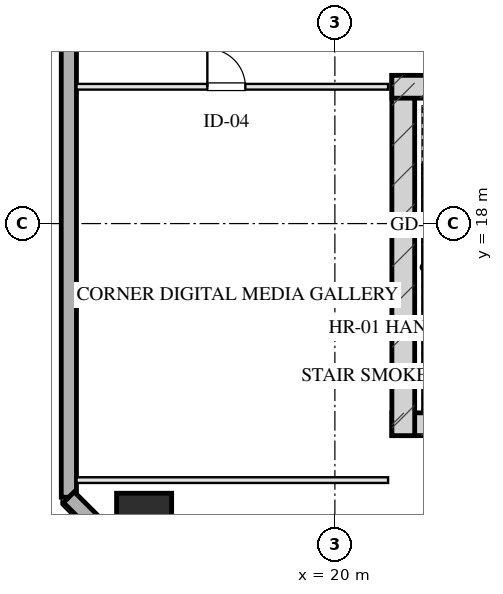
"""IFC4 building model, lengths in metres.
Left out: names, types, materials, properties, quantities, classifications, styles, units other than length and angle.
Written with IfcOpenShell. Run it as: python <this file> out.ifc"""

import sys

from ifc_helpers import new_model, si_unit, direction, frame, frame_2d, origin, origin_2d, place, context, subcontext, project, spatial, rectangle, hollow_rectangle, extrude, element, fill, save


model = new_model("IFC4")
c1 = context("Model", 3, precision=1e-05, world=origin(), true_north=direction((0.0, 1.0)))
c2 = subcontext(c1, "Body", "Model", "MODEL_VIEW")
j1 = project(units=[si_unit("LENGTHUNIT", "METRE"), si_unit("PLANEANGLEUNIT", "RADIAN")], contexts=[c1])
p1 = place(None, origin())
s1 = spatial("IfcSite", under=j1, at=p1, CompositionType="ELEMENT")
p2 = place(p1, origin())
s2 = spatial("IfcBuilding", under=s1, at=p2, CompositionType="ELEMENT")
p3 = place(p2, frame((0.0, 0.0, 173.65)))
s3 = spatial("IfcBuildingStorey", under=s2, at=p3, CompositionType="ELEMENT", Elevation=173.65)
p4 = place(p3, frame((21.5, 12.72, 0.0), z_axis=(0.0, 0.0, 1.0), x_axis=(1.0, 0.0, 0.0)))
e1 = element("IfcWall", 1, at=p4, inside=s3, PredefinedType="SHEAR", context=c2, shape_type="SweptSolid", body=[
    extrude(rectangle(XDim=17.0, YDim=0.6, at=frame_2d((8.5, 0.0))), origin(), (0.0, 0.0, 1.0), 3.45),
])
p5 = place(p3, frame((21.8, 21.9, 0.0), z_axis=(0.0, 0.0, 1.0), x_axis=(0.0, -1.0, 0.0)))
e2 = element("IfcWall", 2, at=p5, inside=s3, PredefinedType="SHEAR", context=c2, shape_type="SweptSolid", body=[
    extrude(rectangle(XDim=9.48, YDim=0.6, at=frame_2d((4.74, 0.0))), origin(), (0.0, 0.0, 1.0), 3.45),
])
p6 = place(p3, frame((21.5, 21.6, 0.0), z_axis=(0.0, 0.0, 1.0), x_axis=(1.0, 0.0, 0.0)))
e3 = element("IfcWall", 3, at=p6, inside=s3, PredefinedType="SHEAR", context=c2, shape_type="SweptSolid", body=[
    extrude(rectangle(XDim=4.22, YDim=0.6, at=frame_2d((2.11, 0.0))), origin(), (0.0, 0.0, 1.0), 3.45),
])
p7 = place(p3, frame((14.98, 10.18, 0.0), z_axis=(0.0, 0.0, 1.0), x_axis=(1.0, 0.0, 0.0)))
e4 = element("IfcColumn", 4, at=p7, inside=s3, PredefinedType="COLUMN", context=c2, shape_type="SweptSolid", body=[
    extrude(hollow_rectangle(XDim=1.45, YDim=1.45, WallThickness=0.05, at=origin_2d()), origin(), (0.0, 0.0, 1.0), 3.451),
])
p8 = place(p3, frame((13.0, 10.8, 0.0), z_axis=(0.0, 0.0, 1.0), x_axis=(0.0, 1.0, 0.0)))
e5 = element("IfcWall", 5, at=p8, inside=s3, PredefinedType="SOLIDWALL", context=c2, shape_type="SweptSolid", body=[
    extrude(rectangle(XDim=46.4, YDim=0.4, at=frame_2d((23.2, 0.0))), origin(), (0.0, 0.0, 1.0), 2.61),
])
p9 = place(p8, frame((16.85, 0.0, 0.0)))
e6 = element("IfcOpeningElement", 6, at=p9, cuts=e5, PredefinedType="OPENING", context=c2, shape_type="SweptSolid", body=[
    extrude(rectangle(XDim=1.1, YDim=2.15, at=frame_2d((0.55, 1.075))), frame((0.0, 0.21, 0.0), z_axis=(0.0, -1.0, 0.0), x_axis=(1.0, 0.0, 0.0)), (0.0, 0.0, 1.0), 0.42),
])
p10 = place(p3, frame((15.6, 8.2, 0.0), z_axis=(0.0, 0.0, 1.0), x_axis=(-0.707106781187, 0.707106781187, 0.0)))
e7 = element("IfcWall", 7, at=p10, inside=s3, PredefinedType="SOLIDWALL", context=c2, shape_type="SweptSolid", body=[
    extrude(rectangle(XDim=3.677, YDim=0.4, at=frame_2d((1.838, 0.0))), origin(), (0.0, 0.0, 1.0), 2.61),
])
p11 = place(p3, frame((13.2, 11.25, 0.0), z_axis=(0.0, 0.0, 1.0), x_axis=(1.0, 0.0, 0.0)))
e8 = element("IfcWall", 8, at=p11, inside=s3, PredefinedType="PARTITIONING", context=c2, shape_type="SweptSolid", body=[
    extrude(rectangle(XDim=8.2, YDim=0.15, at=frame_2d((4.1, 0.0))), origin(), (0.0, 0.0, 1.0), 3.175),
])
p12 = place(p3, frame((13.2, 21.6, 0.0), z_axis=(0.0, 0.0, 1.0), x_axis=(1.0, 0.0, 0.0)))
e9 = element("IfcWall", 9, at=p12, inside=s3, PredefinedType="PARTITIONING", context=c2, shape_type="SweptSolid", body=[
    extrude(rectangle(XDim=8.2, YDim=0.15, at=frame_2d((4.1, 0.0))), origin(), (0.0, 0.0, 1.0), 3.175),
])
p13 = place(p12, frame((3.444, 0.0, 0.0)))
e10 = element("IfcOpeningElement", 10, at=p13, cuts=e9, PredefinedType="OPENING", context=c2, shape_type="SweptSolid", body=[
    extrude(rectangle(XDim=1.0, YDim=2.05, at=frame_2d((0.5, 1.025))), frame((0.0, 0.085, 0.0), z_axis=(0.0, -1.0, 0.0), x_axis=(1.0, 0.0, 0.0)), (0.0, 0.0, 1.0), 0.17),
])
p14 = place(p13, origin())
e11 = element("IfcDoor", 11, at=p14, inside=s3, OperationType="SINGLE_SWING_LEFT", PredefinedType="DOOR", context=c2, shape_type="SweptSolid", body=[
    extrude(rectangle(XDim=1.0, YDim=2.05, at=frame_2d((0.5, 1.025))), frame((0.0, 0.025, 0.0), z_axis=(0.0, -1.0, 0.0), x_axis=(1.0, 0.0, 0.0)), (0.0, 0.0, 1.0), 0.05),
])
fill(e10, e11)
save(model, sys.argv[1])
